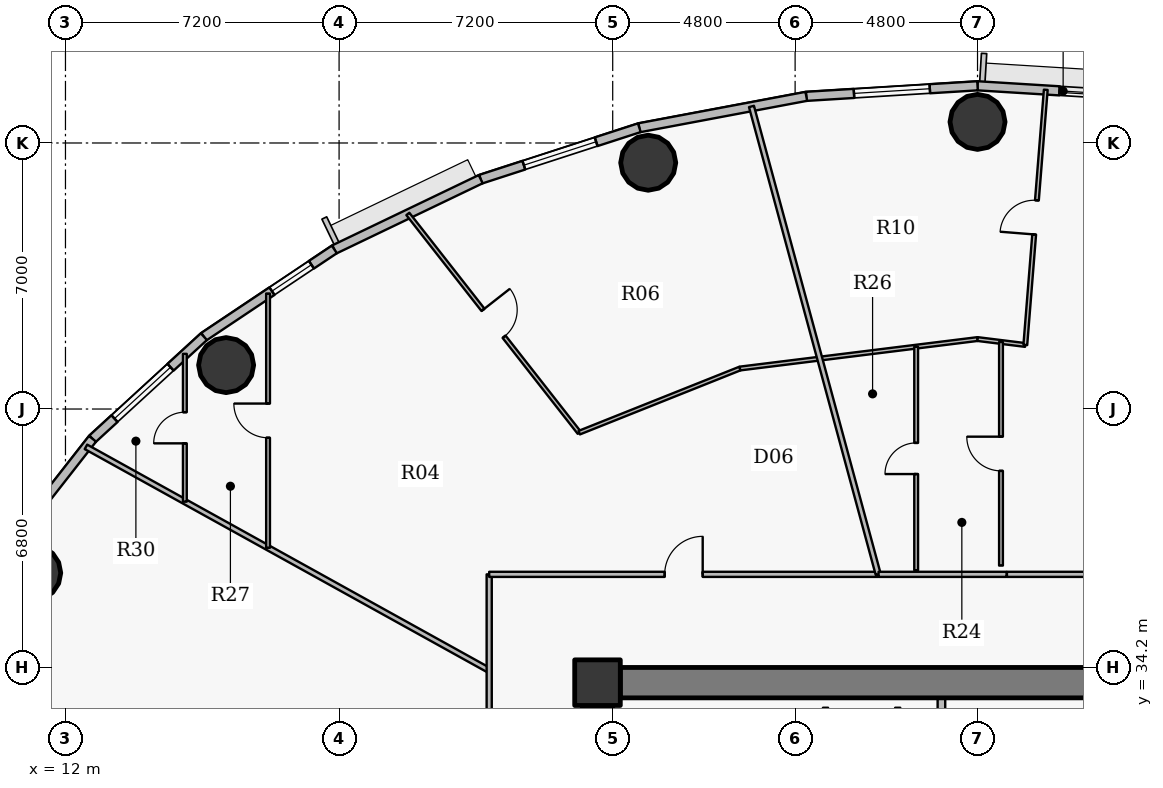
"""IFC4 building model, lengths in metres.
Left out: names, types, materials, properties, quantities, classifications, styles, units other than length and angle.
Written with IfcOpenShell. Run it as: python <this file> out.ifc"""

import sys

from ifc_helpers import new_model, si_unit, direction, frame, frame_2d, origin, origin_2d, place, context, subcontext, project, spatial, rectangle, hollow_circle, extrude, source, transform, mapped, element, fill, save


model = new_model("IFC4")
c1 = context("Model", 3, precision=1e-05, world=origin(), true_north=direction((0.0, 1.0)))
c2 = subcontext(c1, "Body", "Model", "MODEL_VIEW")
j1 = project(units=[si_unit("LENGTHUNIT", "METRE"), si_unit("PLANEANGLEUNIT", "RADIAN")], contexts=[c1])
p1 = place(None, origin())
s1 = spatial("IfcSite", under=j1, at=p1, CompositionType="ELEMENT")
p2 = place(p1, origin())
s2 = spatial("IfcBuilding", under=s1, at=p2, CompositionType="ELEMENT")
p3 = place(p2, frame((0.0, 0.0, 138.45)))
s3 = spatial("IfcBuildingStorey", under=s2, at=p3, CompositionType="ELEMENT", Elevation=138.45)
p4 = place(p3, frame((26.0, 33.8, 0.0), z_axis=(0.0, 0.0, 1.0), x_axis=(1.0, 0.0, 0.0)))
e1 = element("IfcColumn", 1, at=p4, inside=s3, PredefinedType="COLUMN", context=c2, shape_type="SweptSolid", body=[
    extrude(rectangle(XDim=1.2, YDim=1.2, at=origin_2d()), origin(), (0.0, 0.0, 1.0), 3.75),
])
p5 = place(p3, frame((26.6, 33.8, 0.0), z_axis=(0.0, 0.0, 1.0), x_axis=(1.0, 0.0, 0.0)))
e2 = element("IfcWall", 2, at=p5, inside=s3, PredefinedType="SHEAR", context=c2, shape_type="SweptSolid", body=[
    extrude(rectangle(XDim=18.8, YDim=0.8, at=frame_2d((9.4, 0.0))), origin(), (0.0, 0.0, 1.0), 2.95),
])
p6 = place(p3, frame((26.0, 20.8, 0.0), z_axis=(0.0, 0.0, 1.0), x_axis=(0.0, 1.0, 0.0)))
e3 = element("IfcWall", 3, at=p6, inside=s3, PredefinedType="SHEAR", context=c2, shape_type="SweptSolid", body=[
    extrude(rectangle(XDim=12.4, YDim=0.8, at=frame_2d((6.2, 0.0))), origin(), (0.0, 0.0, 1.0), 2.95),
])
p7 = place(p6, frame((5.79, 0.0, 0.0)))
e4 = element("IfcOpeningElement", 4, at=p7, cuts=e3, PredefinedType="OPENING", context=c2, shape_type="SweptSolid", body=[
    extrude(rectangle(XDim=0.82, YDim=2.1, at=origin_2d()), frame((0.41, 0.41, 1.05), z_axis=(0.0, -1.0, 0.0), x_axis=(1.0, 0.0, 0.0)), (0.0, 0.0, 1.0), 0.82),
])
for number, where, z_axis, x_axis in (
    (5, (36.0, 48.555, 0.0), (0.0, 0.0, 1.0), (1.0, 0.0, 0.0)),
    (6, (27.334, 47.481, 0.0), (0.0, 0.0, 1.0), (1.0, 0.0, 0.0)),
    (7, (16.227, 42.156, 0.0), (0.0, 0.0, 1.0), (1.0, 0.0, 0.0)),
    (8, (11.151, 36.688, 0.0), (0.0, 0.0, 1.0), (1.0, 0.0, 0.0)),
):
    element("IfcColumn", number, at=place(p3, frame(where, z_axis=z_axis, x_axis=x_axis)), inside=s3, PredefinedType="COLUMN", context=c2, shape_type="SweptSolid", body=[
        extrude(hollow_circle(Radius=0.725, WallThickness=0.042, at=origin_2d()), origin(), (0.0, 0.0, 1.0), 3.75),
    ])
p8 = place(p3, frame((36.0, 49.505, 0.0), z_axis=(0.0, 0.0, 1.0), x_axis=(0.998107531589, -0.061492726276, 0.0)))
e9 = element("IfcWall", 9, at=p8, inside=s3, PredefinedType="SOLIDWALL", context=c2, shape_type="SweptSolid", body=[
    extrude(rectangle(XDim=4.514, YDim=0.24, at=frame_2d((2.257, 0.0))), origin(), (0.0, 0.0, 1.0), 3.5),
])
p9 = place(p8, frame((2.161, 0.0, 0.9)))
e10 = element("IfcOpeningElement", 10, at=p9, cuts=e9, PredefinedType="OPENING", context=c2, shape_type="SweptSolid", body=[
    extrude(rectangle(XDim=1.6, YDim=1.75, at=origin_2d()), frame((0.8, 0.13, 0.875), z_axis=(0.0, -1.0, 0.0), x_axis=(1.0, 0.0, 0.0)), (0.0, 0.0, 1.0), 0.26),
])
p10 = place(p3, frame((31.494, 49.227, 0.0), z_axis=(0.0, 0.0, 1.0), x_axis=(0.998107531589, 0.061492726276, 0.0)))
e11 = element("IfcWall", 11, at=p10, inside=s3, PredefinedType="SOLIDWALL", context=c2, shape_type="SweptSolid", body=[
    extrude(rectangle(XDim=4.514, YDim=0.24, at=frame_2d((2.257, 0.0))), origin(), (0.0, 0.0, 1.0), 3.5),
])
p11 = place(p10, frame((1.257, 0.0, 0.9)))
e12 = element("IfcOpeningElement", 12, at=p11, cuts=e11, PredefinedType="OPENING", context=c2, shape_type="SweptSolid", body=[
    extrude(rectangle(XDim=2.0, YDim=1.75, at=origin_2d()), frame((1.0, 0.13, 0.875), z_axis=(0.0, -1.0, 0.0), x_axis=(1.0, 0.0, 0.0)), (0.0, 0.0, 1.0), 0.26),
])
p12 = place(p3, frame((27.1, 48.401, 0.0), z_axis=(0.0, 0.0, 1.0), x_axis=(0.982789252177, 0.184730305596, 0.0)))
e13 = element("IfcWall", 13, at=p12, inside=s3, PredefinedType="SOLIDWALL", context=c2, shape_type="SweptSolid", body=[
    extrude(rectangle(XDim=4.471, YDim=0.24, at=frame_2d((2.235, 0.0))), origin(), (0.0, 0.0, 1.0), 3.5),
])
p13 = place(p3, frame((22.926, 47.047, 0.0), z_axis=(0.0, 0.0, 1.0), x_axis=(0.951211346073, 0.308540070495, 0.0)))
e14 = element("IfcWall", 14, at=p13, inside=s3, PredefinedType="SOLIDWALL", context=c2, shape_type="SweptSolid", body=[
    extrude(rectangle(XDim=4.388, YDim=0.24, at=frame_2d((2.194, 0.0))), origin(), (0.0, 0.0, 1.0), 3.5),
])
p14 = place(p13, frame((1.194, 0.0, 0.9)))
e15 = element("IfcOpeningElement", 15, at=p14, cuts=e14, PredefinedType="OPENING", context=c2, shape_type="SweptSolid", body=[
    extrude(rectangle(XDim=2.0, YDim=1.75, at=origin_2d()), frame((1.0, 0.13, 0.875), z_axis=(0.0, -1.0, 0.0), x_axis=(1.0, 0.0, 0.0)), (0.0, 0.0, 1.0), 0.26),
])
p15 = place(p3, frame((19.075, 45.199, 0.0), z_axis=(0.0, 0.0, 1.0), x_axis=(0.901589935876, 0.432591709962, 0.0)))
e16 = element("IfcWall", 16, at=p15, inside=s3, PredefinedType="SOLIDWALL", context=c2, shape_type="SweptSolid", body=[
    extrude(rectangle(XDim=4.272, YDim=0.24, at=frame_2d((2.136, 0.0))), origin(), (0.0, 0.0, 1.0), 3.5),
])
p16 = place(p3, frame((15.642, 42.903, 0.0), z_axis=(0.0, 0.0, 1.0), x_axis=(0.831221811447, 0.555940914284, 0.0)))
e17 = element("IfcWall", 17, at=p16, inside=s3, PredefinedType="SOLIDWALL", context=c2, shape_type="SweptSolid", body=[
    extrude(rectangle(XDim=4.13, YDim=0.24, at=frame_2d((2.065, 0.0))), origin(), (0.0, 0.0, 1.0), 3.5),
])
p17 = place(p16, frame((2.156, 0.0, 0.9)))
e18 = element("IfcOpeningElement", 18, at=p17, cuts=e17, PredefinedType="OPENING", context=c2, shape_type="SweptSolid", body=[
    extrude(rectangle(XDim=1.25, YDim=1.65, at=origin_2d()), frame((0.625, 0.13, 0.825), z_axis=(0.0, -1.0, 0.0), x_axis=(1.0, 0.0, 0.0)), (0.0, 0.0, 1.0), 0.26),
])
p18 = place(p3, frame((12.711, 40.217, 0.0), z_axis=(0.0, 0.0, 1.0), x_axis=(0.737113356241, 0.675769117414, 0.0)))
e19 = element("IfcWall", 19, at=p18, inside=s3, PredefinedType="SOLIDWALL", context=c2, shape_type="SweptSolid", body=[
    extrude(rectangle(XDim=3.976, YDim=0.24, at=frame_2d((1.988, 0.0))), origin(), (0.0, 0.0, 1.0), 3.5),
])
p19 = place(p18, frame((0.787, 0.0, 0.9)))
e20 = element("IfcOpeningElement", 20, at=p19, cuts=e19, PredefinedType="OPENING", context=c2, shape_type="SweptSolid", body=[
    extrude(rectangle(XDim=2.0, YDim=1.75, at=origin_2d()), frame((1.0, 0.13, 0.875), z_axis=(0.0, -1.0, 0.0), x_axis=(1.0, 0.0, 0.0)), (0.0, 0.0, 1.0), 0.26),
])
p20 = place(p3, frame((10.355, 37.206, 0.0), z_axis=(0.0, 0.0, 1.0), x_axis=(0.616272103517, 0.787533297345, 0.0)))
e21 = element("IfcWall", 21, at=p20, inside=s3, PredefinedType="SOLIDWALL", context=c2, shape_type="SweptSolid", body=[
    extrude(rectangle(XDim=3.823, YDim=0.24, at=frame_2d((1.912, 0.0))), origin(), (0.0, 0.0, 1.0), 3.5),
])
p21 = place(p3, frame((12.539, 40.005, 0.0), z_axis=(0.0, 0.0, 1.0), x_axis=(0.874619146564, -0.484810631549, 0.0)))
e22 = element("IfcWall", 22, at=p21, inside=s3, PredefinedType="PARTITIONING", context=c2, shape_type="SweptSolid", body=[
    extrude(rectangle(XDim=12.132, YDim=0.135, at=frame_2d((6.066, 0.0))), origin(), (0.0, 0.0, 1.0), 2.935),
])
p22 = place(p3, frame((15.142, 38.562, 0.0), z_axis=(0.0, 0.0, 1.0), x_axis=(0.0, 1.0, 0.0)))
e23 = element("IfcWall", 23, at=p22, inside=s3, PredefinedType="PARTITIONING", context=c2, shape_type="SweptSolid", body=[
    extrude(rectangle(XDim=3.89, YDim=0.1, at=frame_2d((1.945, 0.0))), origin(), (0.0, 0.0, 1.0), 2.935),
])
p23 = place(p22, frame((1.535, 0.0, 0.0)))
e24 = element("IfcOpeningElement", 24, at=p23, cuts=e23, PredefinedType="OPENING", context=c2, shape_type="SweptSolid", body=[
    extrude(rectangle(XDim=0.82, YDim=2.1, at=origin_2d()), frame((0.41, 0.06, 1.05), z_axis=(0.0, -1.0, 0.0), x_axis=(1.0, 0.0, 0.0)), (0.0, 0.0, 1.0), 0.12),
])
p24 = place(p3, frame((17.331, 37.348, 0.0), z_axis=(0.0, 0.0, 1.0), x_axis=(0.0, 1.0, 0.0)))
e25 = element("IfcWall", 25, at=p24, inside=s3, PredefinedType="PARTITIONING", context=c2, shape_type="SweptSolid", body=[
    extrude(rectangle(XDim=6.691, YDim=0.1, at=frame_2d((3.345, 0.0))), origin(), (0.0, 0.0, 1.0), 2.935),
])
p25 = place(p24, frame((2.895, 0.0, 0.0)))
e26 = element("IfcOpeningElement", 26, at=p25, cuts=e25, PredefinedType="OPENING", context=c2, shape_type="SweptSolid", body=[
    extrude(rectangle(XDim=0.9, YDim=2.1, at=origin_2d()), frame((0.45, 0.06, 1.05), z_axis=(0.0, -1.0, 0.0), x_axis=(1.0, 0.0, 0.0)), (0.0, 0.0, 1.0), 0.12),
])
p26 = place(p3, frame((21.01, 46.133, 0.0), z_axis=(0.0, 0.0, 1.0), x_axis=(0.616738538538, -0.787168072956, 0.0)))
e27 = element("IfcWall", 27, at=p26, inside=s3, PredefinedType="PARTITIONING", context=c2, shape_type="SweptSolid", body=[
    extrude(rectangle(XDim=7.312, YDim=0.1, at=frame_2d((3.656, 0.0))), origin(), (0.0, 0.0, 1.0), 2.935),
])
p27 = place(p26, frame((3.206, 0.0, 0.0)))
e28 = element("IfcOpeningElement", 28, at=p27, cuts=e27, PredefinedType="OPENING", context=c2, shape_type="SweptSolid", body=[
    extrude(rectangle(XDim=0.9, YDim=2.1, at=origin_2d()), frame((0.45, 0.06, 1.05), z_axis=(0.0, -1.0, 0.0), x_axis=(1.0, 0.0, 0.0)), (0.0, 0.0, 1.0), 0.12),
])
p28 = place(p3, frame((23.15, 17.35, 0.0), z_axis=(0.0, 0.0, 1.0), x_axis=(0.0, 1.0, 0.0)))
e29 = element("IfcWall", 29, at=p28, inside=s3, PredefinedType="PARTITIONING", context=c2, shape_type="SweptSolid", body=[
    extrude(rectangle(XDim=19.3, YDim=0.135, at=frame_2d((9.65, 0.0))), origin(), (0.0, 0.0, 1.0), 2.935),
])
p29 = place(p28, frame((11.733, 0.0, 0.0)))
e30 = element("IfcOpeningElement", 30, at=p29, cuts=e29, PredefinedType="OPENING", context=c2, shape_type="SweptSolid", body=[
    extrude(rectangle(XDim=1.05, YDim=2.15, at=origin_2d()), frame((0.525, 0.078, 1.075), z_axis=(0.0, -1.0, 0.0), x_axis=(1.0, 0.0, 0.0)), (0.0, 0.0, 1.0), 0.155),
])
p30 = place(p28, frame((6.074, 0.0, 0.0)))
e31 = element("IfcOpeningElement", 31, at=p30, cuts=e29, PredefinedType="OPENING", context=c2, shape_type="SweptSolid", body=[
    extrude(rectangle(XDim=0.82, YDim=2.1, at=origin_2d()), frame((0.41, 0.078, 1.05), z_axis=(0.0, -1.0, 0.0), x_axis=(1.0, 0.0, 0.0)), (0.0, 0.0, 1.0), 0.155),
])
p31 = place(p3, frame((23.15, 36.65, 0.0), z_axis=(0.0, 0.0, 1.0), x_axis=(1.0, 0.0, 0.0)))
e32 = element("IfcWall", 32, at=p31, inside=s3, PredefinedType="PARTITIONING", context=c2, shape_type="SweptSolid", body=[
    extrude(rectangle(XDim=10.236, YDim=0.135, at=frame_2d((5.118, 0.0))), origin(), (0.0, 0.0, 1.0), 2.935),
])
p32 = place(p31, frame((4.618, 0.0, 0.0)))
e33 = element("IfcOpeningElement", 33, at=p32, cuts=e32, PredefinedType="OPENING", context=c2, shape_type="SweptSolid", body=[
    extrude(rectangle(XDim=1.0, YDim=2.15, at=origin_2d()), frame((0.5, 0.078, 1.075), z_axis=(0.0, -1.0, 0.0), x_axis=(1.0, 0.0, 0.0)), (0.0, 0.0, 1.0), 0.155),
])
p33 = place(p3, frame((25.519, 40.378, 0.0), z_axis=(0.0, 0.0, 1.0), x_axis=(0.928790623107, 0.37060488182, 0.0)))
e34 = element("IfcWall", 34, at=p33, inside=s3, PredefinedType="PARTITIONING", context=c2, shape_type="SweptSolid", body=[
    extrude(rectangle(XDim=4.554, YDim=0.1, at=frame_2d((2.277, 0.0))), origin(), (0.0, 0.0, 1.0), 2.935),
])
p34 = place(p3, frame((29.749, 42.066, 0.0), z_axis=(0.0, 0.0, 1.0), x_axis=(0.992395485088, 0.123090215599, 0.0)))
e35 = element("IfcWall", 35, at=p34, inside=s3, PredefinedType="PARTITIONING", context=c2, shape_type="SweptSolid", body=[
    extrude(rectangle(XDim=6.299, YDim=0.1, at=frame_2d((3.15, 0.0))), origin(), (0.0, 0.0, 1.0), 2.935),
])
p35 = place(p3, frame((30.052, 48.961, 0.0), z_axis=(0.0, 0.0, 1.0), x_axis=(0.261432565902, -0.965221743169, 0.0)))
e36 = element("IfcWall", 36, at=p35, inside=s3, PredefinedType="PARTITIONING", context=c2, shape_type="SweptSolid", body=[
    extrude(rectangle(XDim=12.755, YDim=0.135, at=frame_2d((6.377, 0.0))), origin(), (0.0, 0.0, 1.0), 2.935),
])
p36 = place(p3, frame((34.385, 36.757, 0.0), z_axis=(0.0, 0.0, 1.0), x_axis=(0.0, 1.0, 0.0)))
e37 = element("IfcWall", 37, at=p36, inside=s3, PredefinedType="PARTITIONING", context=c2, shape_type="SweptSolid", body=[
    extrude(rectangle(XDim=5.884, YDim=0.1, at=frame_2d((2.942, 0.0))), origin(), (0.0, 0.0, 1.0), 3.035),
])
p37 = place(p36, frame((2.532, 0.0, 0.0)))
e38 = element("IfcOpeningElement", 38, at=p37, cuts=e37, PredefinedType="OPENING", context=c2, shape_type="SweptSolid", body=[
    extrude(rectangle(XDim=0.82, YDim=2.1, at=origin_2d()), frame((0.41, 0.06, 1.05), z_axis=(0.0, -1.0, 0.0), x_axis=(1.0, 0.0, 0.0)), (0.0, 0.0, 1.0), 0.12),
])
p38 = place(p3, frame((35.05, 31.05, 0.0), z_axis=(0.0, 0.0, 1.0), x_axis=(0.0, 1.0, 0.0)))
e39 = element("IfcWall", 39, at=p38, inside=s3, PredefinedType="PARTITIONING", context=c2, shape_type="SweptSolid", body=[
    extrude(rectangle(XDim=2.35, YDim=0.2, at=frame_2d((1.175, 0.0))), origin(), (0.0, 0.0, 1.0), 3.085),
])
p39 = place(p3, frame((36.0, 42.841, 0.0), z_axis=(0.0, 0.0, 1.0), x_axis=(0.992384274499, -0.123180565541, 0.0)))
e40 = element("IfcWall", 40, at=p39, inside=s3, PredefinedType="PARTITIONING", context=c2, shape_type="SweptSolid", body=[
    extrude(rectangle(XDim=1.267, YDim=0.1, at=frame_2d((0.633, 0.0))), origin(), (0.0, 0.0, 1.0), 2.935),
])
p40 = place(p3, frame((36.617, 36.881, 0.0), z_axis=(0.0, 0.0, 1.0), x_axis=(0.0, 1.0, 0.0)))
e41 = element("IfcWall", 41, at=p40, inside=s3, PredefinedType="PARTITIONING", context=c2, shape_type="SweptSolid", body=[
    extrude(rectangle(XDim=5.884, YDim=0.1, at=frame_2d((2.942, 0.0))), origin(), (0.0, 0.0, 1.0), 3.5),
])
p41 = place(p40, frame((2.492, 0.0, 0.0)))
e42 = element("IfcOpeningElement", 42, at=p41, cuts=e41, PredefinedType="OPENING", context=c2, shape_type="SweptSolid", body=[
    extrude(rectangle(XDim=0.9, YDim=2.1, at=origin_2d()), frame((0.45, 0.06, 1.05), z_axis=(0.0, -1.0, 0.0), x_axis=(1.0, 0.0, 0.0)), (0.0, 0.0, 1.0), 0.12),
])
p42 = place(p3, frame((36.774, 36.65, 0.0), z_axis=(0.0, 0.0, 1.0), x_axis=(1.0, 0.0, 0.0)))
e43 = element("IfcWall", 43, at=p42, inside=s3, PredefinedType="PARTITIONING", context=c2, shape_type="SweptSolid", body=[
    extrude(rectangle(XDim=12.076, YDim=0.135, at=frame_2d((6.038, 0.0))), origin(), (0.0, 0.0, 1.0), 2.935),
])
p43 = place(p42, frame((5.538, 0.0, 0.0)))
e44 = element("IfcOpeningElement", 44, at=p43, cuts=e43, PredefinedType="OPENING", context=c2, shape_type="SweptSolid", body=[
    extrude(rectangle(XDim=1.0, YDim=2.15, at=origin_2d()), frame((0.5, 0.078, 1.075), z_axis=(0.0, -1.0, 0.0), x_axis=(1.0, 0.0, 0.0)), (0.0, 0.0, 1.0), 0.155),
])
p44 = place(p3, frame((37.258, 42.685, 0.0), z_axis=(0.0, 0.0, 1.0), x_axis=(0.079919529762, 0.9968013186, 0.0)))
e45 = element("IfcWall", 45, at=p44, inside=s3, PredefinedType="PARTITIONING", context=c2, shape_type="SweptSolid", body=[
    extrude(rectangle(XDim=6.736, YDim=0.1, at=frame_2d((3.368, 0.0))), origin(), (0.0, 0.0, 1.0), 2.935),
])
p45 = place(p44, frame((2.918, 0.0, 0.0)))
e46 = element("IfcOpeningElement", 46, at=p45, cuts=e45, PredefinedType="OPENING", context=c2, shape_type="SweptSolid", body=[
    extrude(rectangle(XDim=0.9, YDim=2.1, at=origin_2d()), frame((0.45, 0.06, 1.05), z_axis=(0.0, -1.0, 0.0), x_axis=(1.0, 0.0, 0.0)), (0.0, 0.0, 1.0), 0.12),
])
p46 = place(p3, frame((32.0, 33.14, 0.0), z_axis=(0.0, 0.0, 1.0), x_axis=(0.0, -1.0, 0.0)))
e47 = element("IfcWall", 47, at=p46, inside=s3, PredefinedType="PARTITIONING", context=c2, shape_type="SweptSolid", body=[
    extrude(rectangle(XDim=1.03, YDim=0.135, at=frame_2d((0.515, 0.0))), origin(), (0.0, 0.0, 1.0), 3.035),
])
p47 = place(p3, frame((33.9, 32.11, 0.0), z_axis=(0.0, 0.0, 1.0), x_axis=(0.0, 1.0, 0.0)))
e48 = element("IfcWall", 48, at=p47, inside=s3, PredefinedType="PARTITIONING", context=c2, shape_type="SweptSolid", body=[
    extrude(rectangle(XDim=1.03, YDim=0.135, at=frame_2d((0.515, 0.0))), origin(), (0.0, 0.0, 1.0), 3.085),
])
p48 = place(p3, frame((33.396, 36.65, 0.0), z_axis=(0.0, 0.0, 1.0), x_axis=(1.0, 0.0, 0.0)))
e49 = element("IfcWall", 49, at=p48, inside=s3, PredefinedType="PARTITIONING", context=c2, shape_type="SweptSolid", body=[
    extrude(rectangle(XDim=3.367, YDim=0.135, at=frame_2d((1.684, 0.0))), origin(), (0.0, 0.0, 1.0), 2.935),
])
p49 = place(p3, frame((26.59, 34.2, 0.0), z_axis=(0.0, 0.0, 1.0), x_axis=(-1.0, 0.0, 0.0)))
e50 = element("IfcWall", 50, at=p49, inside=s3, PredefinedType="PARTITIONING", context=c2, shape_type="SweptSolid", body=[
    extrude(rectangle(XDim=0.99, YDim=0.135, at=frame_2d((0.495, 0.0))), origin(), (0.0, 0.0, 1.0), 2.935),
])
p50 = place(p3, frame((25.6, 33.893, 0.0), z_axis=(0.0, 0.0, 1.0), x_axis=(0.0, -1.0, 0.0)))
e51 = element("IfcWall", 51, at=p50, inside=s3, PredefinedType="PARTITIONING", context=c2, shape_type="SweptSolid", body=[
    extrude(rectangle(XDim=0.683, YDim=0.135, at=frame_2d((0.341, 0.0))), origin(), (0.0, 0.0, 1.0), 3.5),
])
m1 = source(origin(), c2, "Body", "SweptSolid", [
    extrude(rectangle(XDim=1.6, YDim=1.75, at=origin_2d()), frame((0.8, 0.03, 0.875), z_axis=(0.0, -1.0, 0.0), x_axis=(1.0, 0.0, 0.0)), (0.0, 0.0, 1.0), 0.06),
])
p51 = place(p9, origin())
e52 = element("IfcWindow", 52, at=p51, inside=s3, PartitioningType="DOUBLE_PANEL_VERTICAL", PredefinedType="WINDOW", context=c2, shape_type="MappedRepresentation", body=[
    mapped(m1, transform((0.0, 0.0, 0.0), x_axis=(1.0, 0.0, 0.0), y_axis=(0.0, 1.0, 0.0), z_axis=(0.0, 0.0, 1.0), scale=1.0)),
])
fill(e10, e52)
m2 = source(origin(), c2, "Body", "SweptSolid", [
    extrude(rectangle(XDim=2.0, YDim=1.75, at=origin_2d()), frame((1.0, 0.03, 0.875), z_axis=(0.0, -1.0, 0.0), x_axis=(1.0, 0.0, 0.0)), (0.0, 0.0, 1.0), 0.06),
])
p52 = place(p11, origin())
e53 = element("IfcWindow", 53, at=p52, inside=s3, PartitioningType="DOUBLE_PANEL_VERTICAL", PredefinedType="WINDOW", context=c2, shape_type="MappedRepresentation", body=[
    mapped(m2, transform((0.0, 0.0, 0.0), x_axis=(1.0, 0.0, 0.0), y_axis=(0.0, 1.0, 0.0), z_axis=(0.0, 0.0, 1.0), scale=1.0)),
])
fill(e12, e53)
p53 = place(p14, origin())
e54 = element("IfcWindow", 54, at=p53, inside=s3, PartitioningType="DOUBLE_PANEL_VERTICAL", PredefinedType="WINDOW", context=c2, shape_type="MappedRepresentation", body=[
    mapped(m2, transform((0.0, 0.0, 0.0), x_axis=(1.0, 0.0, 0.0), y_axis=(0.0, 1.0, 0.0), z_axis=(0.0, 0.0, 1.0), scale=1.0)),
])
fill(e15, e54)
p54 = place(p19, origin())
e55 = element("IfcWindow", 55, at=p54, inside=s3, PartitioningType="DOUBLE_PANEL_VERTICAL", PredefinedType="WINDOW", context=c2, shape_type="MappedRepresentation", body=[
    mapped(m2, transform((0.0, 0.0, 0.0), x_axis=(1.0, 0.0, 0.0), y_axis=(0.0, 1.0, 0.0), z_axis=(0.0, 0.0, 1.0), scale=1.0)),
])
fill(e20, e55)
m3 = source(origin(), c2, "Body", "SweptSolid", [
    extrude(rectangle(XDim=1.25, YDim=1.65, at=origin_2d()), frame((0.625, 0.03, 0.825), z_axis=(0.0, -1.0, 0.0), x_axis=(1.0, 0.0, 0.0)), (0.0, 0.0, 1.0), 0.06),
])
p55 = place(p17, origin())
e56 = element("IfcWindow", 56, at=p55, inside=s3, PartitioningType="SINGLE_PANEL", PredefinedType="WINDOW", context=c2, shape_type="MappedRepresentation", body=[
    mapped(m3, transform((0.0, 0.0, 0.0), x_axis=(1.0, 0.0, 0.0), y_axis=(0.0, 1.0, 0.0), z_axis=(0.0, 0.0, 1.0), scale=1.0)),
])
fill(e18, e56)
m4 = source(origin(), c2, "Body", "SweptSolid", [
    extrude(rectangle(XDim=0.9, YDim=2.1, at=origin_2d()), frame((0.45, 0.025, 1.05), z_axis=(0.0, -1.0, 0.0), x_axis=(1.0, 0.0, 0.0)), (0.0, 0.0, 1.0), 0.05),
])
p56 = place(p45, origin())
e57 = element("IfcDoor", 57, at=p56, inside=s3, OperationType="SINGLE_SWING_LEFT", PredefinedType="DOOR", context=c2, shape_type="MappedRepresentation", body=[
    mapped(m4, transform((0.0, 0.0, 0.0), x_axis=(1.0, 0.0, 0.0), y_axis=(0.0, 1.0, 0.0), z_axis=(0.0, 0.0, 1.0), scale=1.0)),
])
fill(e46, e57)
p57 = place(p41, origin())
e58 = element("IfcDoor", 58, at=p57, inside=s3, OperationType="SINGLE_SWING_RIGHT", PredefinedType="DOOR", context=c2, shape_type="MappedRepresentation", body=[
    mapped(m4, transform((0.0, 0.0, 0.0), x_axis=(1.0, 0.0, 0.0), y_axis=(0.0, 1.0, 0.0), z_axis=(0.0, 0.0, 1.0), scale=1.0)),
])
fill(e42, e58)
m5 = source(origin(), c2, "Body", "SweptSolid", [
    extrude(rectangle(XDim=0.82, YDim=2.1, at=origin_2d()), frame((0.41, 0.025, 1.05), z_axis=(0.0, -1.0, 0.0), x_axis=(1.0, 0.0, 0.0)), (0.0, 0.0, 1.0), 0.05),
])
p58 = place(p37, origin())
e59 = element("IfcDoor", 59, at=p58, inside=s3, OperationType="SINGLE_SWING_LEFT", PredefinedType="DOOR", context=c2, shape_type="MappedRepresentation", body=[
    mapped(m5, transform((0.0, 0.0, 0.0), x_axis=(1.0, 0.0, 0.0), y_axis=(0.0, 1.0, 0.0), z_axis=(0.0, 0.0, 1.0), scale=1.0)),
])
fill(e38, e59)
m6 = source(origin(), c2, "Body", "SweptSolid", [
    extrude(rectangle(XDim=1.0, YDim=2.15, at=origin_2d()), frame((0.5, 0.025, 1.075), z_axis=(0.0, -1.0, 0.0), x_axis=(1.0, 0.0, 0.0)), (0.0, 0.0, 1.0), 0.05),
])
p59 = place(p32, origin())
e60 = element("IfcDoor", 60, at=p59, inside=s3, OperationType="SINGLE_SWING_RIGHT", PredefinedType="DOOR", context=c2, shape_type="MappedRepresentation", body=[
    mapped(m6, transform((0.0, 0.0, 0.0), x_axis=(1.0, 0.0, 0.0), y_axis=(0.0, 1.0, 0.0), z_axis=(0.0, 0.0, 1.0), scale=1.0)),
])
fill(e33, e60)
p60 = place(p27, origin())
e61 = element("IfcDoor", 61, at=p60, inside=s3, OperationType="SINGLE_SWING_LEFT", PredefinedType="DOOR", context=c2, shape_type="MappedRepresentation", body=[
    mapped(m4, transform((0.0, 0.0, 0.0), x_axis=(1.0, 0.0, 0.0), y_axis=(0.0, 1.0, 0.0), z_axis=(0.0, 0.0, 1.0), scale=1.0)),
])
fill(e28, e61)
p61 = place(p25, origin())
e62 = element("IfcDoor", 62, at=p61, inside=s3, OperationType="SINGLE_SWING_RIGHT", PredefinedType="DOOR", context=c2, shape_type="MappedRepresentation", body=[
    mapped(m4, transform((0.0, 0.0, 0.0), x_axis=(1.0, 0.0, 0.0), y_axis=(0.0, 1.0, 0.0), z_axis=(0.0, 0.0, 1.0), scale=1.0)),
])
fill(e26, e62)
p62 = place(p23, origin())
e63 = element("IfcDoor", 63, at=p62, inside=s3, OperationType="SINGLE_SWING_LEFT", PredefinedType="DOOR", context=c2, shape_type="MappedRepresentation", body=[
    mapped(m5, transform((0.0, 0.0, 0.0), x_axis=(1.0, 0.0, 0.0), y_axis=(0.0, 1.0, 0.0), z_axis=(0.0, 0.0, 1.0), scale=1.0)),
])
fill(e24, e63)
save(model, sys.argv[1])
